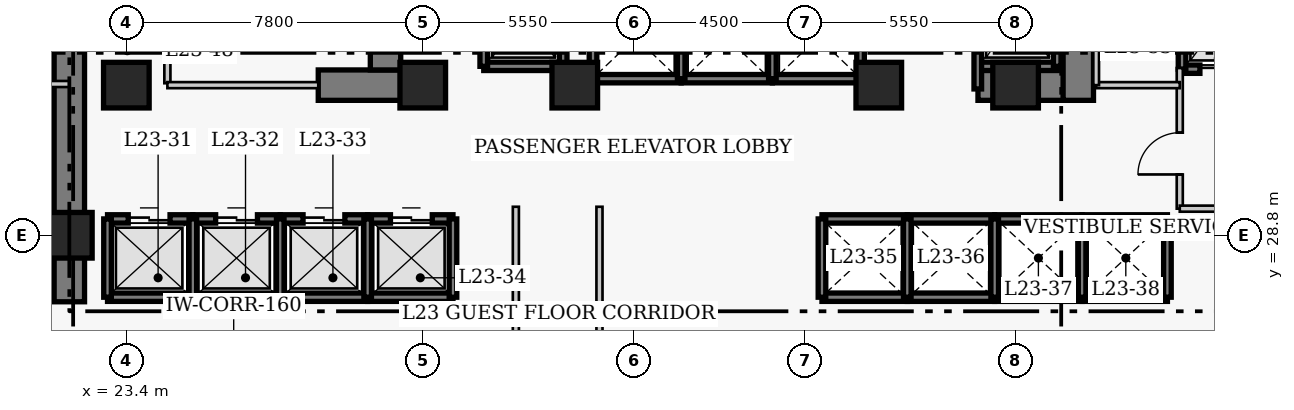
"""IFC4 building model, lengths in metres.
Left out: names, types, materials, properties, quantities, classifications, styles, units other than length and angle.
Written with IfcOpenShell. Run it as: python <this file> out.ifc"""

import sys

from ifc_helpers import new_model, si_unit, direction, frame, frame_2d, origin, origin_2d, place, context, subcontext, project, spatial, rectangle, extrude, element, fill, save


model = new_model("IFC4")
c1 = context("Model", 3, precision=1e-05, world=origin(), true_north=direction((0.0, 1.0)))
c2 = subcontext(c1, "Body", "Model", "MODEL_VIEW")
j1 = project(units=[si_unit("LENGTHUNIT", "METRE"), si_unit("PLANEANGLEUNIT", "RADIAN")], contexts=[c1])
p1 = place(None, origin())
s1 = spatial("IfcSite", under=j1, at=p1, CompositionType="ELEMENT")
p2 = place(p1, origin())
s2 = spatial("IfcBuilding", under=s1, at=p2, CompositionType="ELEMENT")
p3 = place(p2, frame((0.0, 0.0, 95.6)))
s3 = spatial("IfcBuildingStorey", under=s2, at=p3, CompositionType="ELEMENT", Elevation=95.6)
p4 = place(p3, frame((21.9, 27.05, 0.0), z_axis=(0.0, 0.0, 1.0), x_axis=(0.0, 1.0, 0.0)))
e1 = element("IfcWall", 1, at=p4, inside=s3, PredefinedType="SHEAR", context=c2, shape_type="SweptSolid", body=[
    extrude(rectangle(XDim=13.67, YDim=0.8, at=frame_2d((6.835, 0.0))), origin(), (0.0, 0.0, 1.0), 3.8),
])
p5 = place(p3, frame((28.45, 32.75, 0.0), z_axis=(0.0, 0.0, 1.0), x_axis=(1.0, 0.0, 0.0)))
e2 = element("IfcWall", 2, at=p5, inside=s3, PredefinedType="SHEAR", context=c2, shape_type="SweptSolid", body=[
    extrude(rectangle(XDim=2.4, YDim=0.8, at=frame_2d((1.2, 0.0))), origin(), (0.0, 0.0, 1.0), 3.8),
])
p6 = place(p3, frame((45.81, 32.75, 0.0), z_axis=(0.0, 0.0, 1.0), x_axis=(1.0, 0.0, 0.0)))
e3 = element("IfcWall", 3, at=p6, inside=s3, PredefinedType="SHEAR", context=c2, shape_type="SweptSolid", body=[
    extrude(rectangle(XDim=2.64, YDim=0.8, at=frame_2d((1.32, 0.0))), origin(), (0.0, 0.0, 1.0), 3.8),
])
p7 = place(p3, frame((30.22, 33.15, 0.0), z_axis=(0.0, 0.0, 1.0), x_axis=(0.0, 1.0, 0.0)))
e4 = element("IfcWall", 4, at=p7, inside=s3, PredefinedType="SHEAR", context=c2, shape_type="SweptSolid", body=[
    extrude(rectangle(XDim=7.17, YDim=0.8, at=frame_2d((3.585, 0.0))), origin(), (0.0, 0.0, 1.0), 3.8),
])
p8 = place(p3, frame((48.45, 32.35, 0.0), z_axis=(0.0, 0.0, 1.0), x_axis=(0.0, 1.0, 0.0)))
e5 = element("IfcWall", 5, at=p8, inside=s3, PredefinedType="SHEAR", context=c2, shape_type="SweptSolid", body=[
    extrude(rectangle(XDim=7.97, YDim=0.8, at=frame_2d((3.985, 0.0))), origin(), (0.0, 0.0, 1.0), 3.8),
])
p9 = place(p8, frame((5.85, 0.0, 0.0)))
e6 = element("IfcOpeningElement", 6, at=p9, cuts=e5, PredefinedType="OPENING", context=c2, shape_type="SweptSolid", body=[
    extrude(rectangle(XDim=1.1, YDim=2.15, at=frame_2d((0.55, 1.075))), frame((0.0, 0.41, 0.0), z_axis=(0.0, -1.0, 0.0), x_axis=(1.0, 0.0, 0.0)), (0.0, 0.0, 1.0), 0.82),
])
for number, where, z_axis, x_axis in (
    (7, (21.9, 28.8, 0.0), (0.0, 0.0, 1.0), (1.0, 0.0, 0.0)),
    (8, (23.4, 32.75, 0.0), (0.0, 0.0, 1.0), (1.0, 0.0, 0.0)),
    (9, (31.2, 32.75, 0.0), (0.0, 0.0, 1.0), (1.0, 0.0, 0.0)),
    (10, (35.2, 32.75, 0.0), (0.0, 0.0, 1.0), (1.0, 0.0, 0.0)),
    (11, (43.2, 32.75, 0.0), (0.0, 0.0, 1.0), (1.0, 0.0, 0.0)),
    (12, (46.8, 32.75, 0.0), (0.0, 0.0, 1.0), (1.0, 0.0, 0.0)),
):
    element("IfcColumn", number, at=place(p3, frame(where, z_axis=z_axis, x_axis=x_axis)), inside=s3, PredefinedType="COLUMN", context=c2, shape_type="SweptSolid", body=[
        extrude(rectangle(XDim=1.2, YDim=1.2, at=origin_2d()), origin(), (0.0, 0.0, 1.0), 3.8),
    ])
p10 = place(p3, frame((22.905, 29.23, 0.0), z_axis=(0.0, 0.0, 1.0), x_axis=(1.0, 0.0, 0.0)))
e13 = element("IfcWall", 13, at=p10, inside=s3, PredefinedType="SHEAR", context=c2, shape_type="SweptSolid", body=[
    extrude(rectangle(XDim=2.245, YDim=0.22, at=frame_2d((1.123, 0.0))), origin(), (0.0, 0.0, 1.0), 3.8),
])
p11 = place(p10, frame((0.545, 0.0, 0.0)))
e14 = element("IfcOpeningElement", 14, at=p11, cuts=e13, PredefinedType="OPENING", context=c2, shape_type="SweptSolid", body=[
    extrude(rectangle(XDim=1.1, YDim=2.15, at=frame_2d((0.55, 1.075))), frame((0.0, 0.12, 0.0), z_axis=(0.0, -1.0, 0.0), x_axis=(1.0, 0.0, 0.0)), (0.0, 0.0, 1.0), 0.24),
])
p12 = place(p3, frame((22.905, 27.17, 0.0), z_axis=(0.0, 0.0, 1.0), x_axis=(1.0, 0.0, 0.0)))
e15 = element("IfcWall", 15, at=p12, inside=s3, PredefinedType="SHEAR", context=c2, shape_type="SweptSolid", body=[
    extrude(rectangle(XDim=2.245, YDim=0.22, at=frame_2d((1.123, 0.0))), origin(), (0.0, 0.0, 1.0), 3.8),
])
p13 = place(p3, frame((22.905, 27.17, 0.0), z_axis=(0.0, 0.0, 1.0), x_axis=(0.0, 1.0, 0.0)))
e16 = element("IfcWall", 16, at=p13, inside=s3, PredefinedType="SHEAR", context=c2, shape_type="SweptSolid", body=[
    extrude(rectangle(XDim=2.06, YDim=0.2, at=frame_2d((1.03, 0.0))), origin(), (0.0, 0.0, 1.0), 3.8),
])
p14 = place(p3, frame((25.15, 29.23, 0.0), z_axis=(0.0, 0.0, 1.0), x_axis=(1.0, 0.0, 0.0)))
e17 = element("IfcWall", 17, at=p14, inside=s3, PredefinedType="SHEAR", context=c2, shape_type="SweptSolid", body=[
    extrude(rectangle(XDim=2.3, YDim=0.22, at=frame_2d((1.15, 0.0))), origin(), (0.0, 0.0, 1.0), 3.8),
])
p15 = place(p14, frame((0.6, 0.0, 0.0)))
e18 = element("IfcOpeningElement", 18, at=p15, cuts=e17, PredefinedType="OPENING", context=c2, shape_type="SweptSolid", body=[
    extrude(rectangle(XDim=1.1, YDim=2.15, at=frame_2d((0.55, 1.075))), frame((0.0, 0.12, 0.0), z_axis=(0.0, -1.0, 0.0), x_axis=(1.0, 0.0, 0.0)), (0.0, 0.0, 1.0), 0.24),
])
p16 = place(p3, frame((25.15, 27.17, 0.0), z_axis=(0.0, 0.0, 1.0), x_axis=(1.0, 0.0, 0.0)))
e19 = element("IfcWall", 19, at=p16, inside=s3, PredefinedType="SHEAR", context=c2, shape_type="SweptSolid", body=[
    extrude(rectangle(XDim=2.3, YDim=0.22, at=frame_2d((1.15, 0.0))), origin(), (0.0, 0.0, 1.0), 3.8),
])
p17 = place(p3, frame((25.15, 27.17, 0.0), z_axis=(0.0, 0.0, 1.0), x_axis=(0.0, 1.0, 0.0)))
e20 = element("IfcWall", 20, at=p17, inside=s3, PredefinedType="SHEAR", context=c2, shape_type="SweptSolid", body=[
    extrude(rectangle(XDim=2.06, YDim=0.2, at=frame_2d((1.03, 0.0))), origin(), (0.0, 0.0, 1.0), 3.8),
])
p18 = place(p3, frame((27.45, 29.23, 0.0), z_axis=(0.0, 0.0, 1.0), x_axis=(1.0, 0.0, 0.0)))
e21 = element("IfcWall", 21, at=p18, inside=s3, PredefinedType="SHEAR", context=c2, shape_type="SweptSolid", body=[
    extrude(rectangle(XDim=2.3, YDim=0.22, at=frame_2d((1.15, 0.0))), origin(), (0.0, 0.0, 1.0), 3.8),
])
p19 = place(p18, frame((0.6, 0.0, 0.0)))
e22 = element("IfcOpeningElement", 22, at=p19, cuts=e21, PredefinedType="OPENING", context=c2, shape_type="SweptSolid", body=[
    extrude(rectangle(XDim=1.1, YDim=2.15, at=frame_2d((0.55, 1.075))), frame((0.0, 0.12, 0.0), z_axis=(0.0, -1.0, 0.0), x_axis=(1.0, 0.0, 0.0)), (0.0, 0.0, 1.0), 0.24),
])
p20 = place(p3, frame((27.45, 27.17, 0.0), z_axis=(0.0, 0.0, 1.0), x_axis=(1.0, 0.0, 0.0)))
e23 = element("IfcWall", 23, at=p20, inside=s3, PredefinedType="SHEAR", context=c2, shape_type="SweptSolid", body=[
    extrude(rectangle(XDim=2.3, YDim=0.22, at=frame_2d((1.15, 0.0))), origin(), (0.0, 0.0, 1.0), 3.8),
])
p21 = place(p3, frame((27.45, 27.17, 0.0), z_axis=(0.0, 0.0, 1.0), x_axis=(0.0, 1.0, 0.0)))
e24 = element("IfcWall", 24, at=p21, inside=s3, PredefinedType="SHEAR", context=c2, shape_type="SweptSolid", body=[
    extrude(rectangle(XDim=2.06, YDim=0.2, at=frame_2d((1.03, 0.0))), origin(), (0.0, 0.0, 1.0), 3.8),
])
p22 = place(p3, frame((29.75, 29.23, 0.0), z_axis=(0.0, 0.0, 1.0), x_axis=(1.0, 0.0, 0.0)))
e25 = element("IfcWall", 25, at=p22, inside=s3, PredefinedType="SHEAR", context=c2, shape_type="SweptSolid", body=[
    extrude(rectangle(XDim=2.245, YDim=0.22, at=frame_2d((1.123, 0.0))), origin(), (0.0, 0.0, 1.0), 3.8),
])
p23 = place(p22, frame((0.6, 0.0, 0.0)))
e26 = element("IfcOpeningElement", 26, at=p23, cuts=e25, PredefinedType="OPENING", context=c2, shape_type="SweptSolid", body=[
    extrude(rectangle(XDim=1.1, YDim=2.15, at=frame_2d((0.55, 1.075))), frame((0.0, 0.12, 0.0), z_axis=(0.0, -1.0, 0.0), x_axis=(1.0, 0.0, 0.0)), (0.0, 0.0, 1.0), 0.24),
])
p24 = place(p3, frame((29.75, 27.17, 0.0), z_axis=(0.0, 0.0, 1.0), x_axis=(1.0, 0.0, 0.0)))
e27 = element("IfcWall", 27, at=p24, inside=s3, PredefinedType="SHEAR", context=c2, shape_type="SweptSolid", body=[
    extrude(rectangle(XDim=2.245, YDim=0.22, at=frame_2d((1.123, 0.0))), origin(), (0.0, 0.0, 1.0), 3.8),
])
for number, where, z_axis, x_axis in (
    (28, (29.75, 27.17, 0.0), (0.0, 0.0, 1.0), (0.0, 1.0, 0.0)),
    (29, (31.995, 27.17, 0.0), (0.0, 0.0, 1.0), (0.0, 1.0, 0.0)),
):
    element("IfcWall", number, at=place(p3, frame(where, z_axis=z_axis, x_axis=x_axis)), inside=s3, PredefinedType="SHEAR", context=c2, shape_type="SweptSolid", body=[
        extrude(rectangle(XDim=2.06, YDim=0.2, at=frame_2d((1.03, 0.0))), origin(), (0.0, 0.0, 1.0), 3.8),
    ])
for number, where, z_axis, x_axis in (
    (30, (41.705, 29.23, 0.0), (0.0, 0.0, 1.0), (1.0, 0.0, 0.0)),
    (31, (41.705, 27.17, 0.0), (0.0, 0.0, 1.0), (1.0, 0.0, 0.0)),
):
    element("IfcWall", number, at=place(p3, frame(where, z_axis=z_axis, x_axis=x_axis)), inside=s3, PredefinedType="SHEAR", context=c2, shape_type="SweptSolid", body=[
        extrude(rectangle(XDim=2.245, YDim=0.22, at=frame_2d((1.123, 0.0))), origin(), (0.0, 0.0, 1.0), 3.8),
    ])
p25 = place(p3, frame((41.705, 27.17, 0.0), z_axis=(0.0, 0.0, 1.0), x_axis=(0.0, 1.0, 0.0)))
e32 = element("IfcWall", 32, at=p25, inside=s3, PredefinedType="SHEAR", context=c2, shape_type="SweptSolid", body=[
    extrude(rectangle(XDim=2.06, YDim=0.2, at=frame_2d((1.03, 0.0))), origin(), (0.0, 0.0, 1.0), 3.8),
])
for number, where, z_axis, x_axis in (
    (33, (43.95, 29.23, 0.0), (0.0, 0.0, 1.0), (1.0, 0.0, 0.0)),
    (34, (43.95, 27.17, 0.0), (0.0, 0.0, 1.0), (1.0, 0.0, 0.0)),
):
    element("IfcWall", number, at=place(p3, frame(where, z_axis=z_axis, x_axis=x_axis)), inside=s3, PredefinedType="SHEAR", context=c2, shape_type="SweptSolid", body=[
        extrude(rectangle(XDim=2.3, YDim=0.22, at=frame_2d((1.15, 0.0))), origin(), (0.0, 0.0, 1.0), 3.8),
    ])
p26 = place(p3, frame((43.95, 27.17, 0.0), z_axis=(0.0, 0.0, 1.0), x_axis=(0.0, 1.0, 0.0)))
e35 = element("IfcWall", 35, at=p26, inside=s3, PredefinedType="SHEAR", context=c2, shape_type="SweptSolid", body=[
    extrude(rectangle(XDim=2.06, YDim=0.2, at=frame_2d((1.03, 0.0))), origin(), (0.0, 0.0, 1.0), 3.8),
])
for number, where, z_axis, x_axis in (
    (36, (46.25, 29.23, 0.0), (0.0, 0.0, 1.0), (1.0, 0.0, 0.0)),
    (37, (46.25, 27.17, 0.0), (0.0, 0.0, 1.0), (1.0, 0.0, 0.0)),
):
    element("IfcWall", number, at=place(p3, frame(where, z_axis=z_axis, x_axis=x_axis)), inside=s3, PredefinedType="SHEAR", context=c2, shape_type="SweptSolid", body=[
        extrude(rectangle(XDim=2.3, YDim=0.22, at=frame_2d((1.15, 0.0))), origin(), (0.0, 0.0, 1.0), 3.8),
    ])
p27 = place(p3, frame((46.25, 27.17, 0.0), z_axis=(0.0, 0.0, 1.0), x_axis=(0.0, 1.0, 0.0)))
e38 = element("IfcWall", 38, at=p27, inside=s3, PredefinedType="SHEAR", context=c2, shape_type="SweptSolid", body=[
    extrude(rectangle(XDim=2.06, YDim=0.2, at=frame_2d((1.03, 0.0))), origin(), (0.0, 0.0, 1.0), 3.8),
])
for number, where, z_axis, x_axis in (
    (39, (48.55, 29.23, 0.0), (0.0, 0.0, 1.0), (1.0, 0.0, 0.0)),
    (40, (48.55, 27.17, 0.0), (0.0, 0.0, 1.0), (1.0, 0.0, 0.0)),
):
    element("IfcWall", number, at=place(p3, frame(where, z_axis=z_axis, x_axis=x_axis)), inside=s3, PredefinedType="SHEAR", context=c2, shape_type="SweptSolid", body=[
        extrude(rectangle(XDim=2.245, YDim=0.22, at=frame_2d((1.123, 0.0))), origin(), (0.0, 0.0, 1.0), 3.8),
    ])
for number, where, z_axis, x_axis in (
    (41, (48.55, 27.17, 0.0), (0.0, 0.0, 1.0), (0.0, 1.0, 0.0)),
    (42, (50.795, 27.17, 0.0), (0.0, 0.0, 1.0), (0.0, 1.0, 0.0)),
):
    element("IfcWall", number, at=place(p3, frame(where, z_axis=z_axis, x_axis=x_axis)), inside=s3, PredefinedType="SHEAR", context=c2, shape_type="SweptSolid", body=[
        extrude(rectangle(XDim=2.06, YDim=0.2, at=frame_2d((1.03, 0.0))), origin(), (0.0, 0.0, 1.0), 3.8),
    ])
p28 = place(p3, frame((35.68, 32.92, 0.0), z_axis=(0.0, 0.0, 1.0), x_axis=(1.0, 0.0, 0.0)))
e43 = element("IfcWall", 43, at=p28, inside=s3, PredefinedType="SHEAR", context=c2, shape_type="SweptSolid", body=[
    extrude(rectangle(XDim=2.32, YDim=0.22, at=frame_2d((1.16, 0.0))), origin(), (0.0, 0.0, 1.0), 3.8),
])
p29 = place(p3, frame((35.68, 32.92, 0.0), z_axis=(0.0, 0.0, 1.0), x_axis=(0.0, 1.0, 0.0)))
e44 = element("IfcWall", 44, at=p29, inside=s3, PredefinedType="SHEAR", context=c2, shape_type="SweptSolid", body=[
    extrude(rectangle(XDim=2.16, YDim=0.2, at=frame_2d((1.08, 0.0))), origin(), (0.0, 0.0, 1.0), 3.8),
])
p30 = place(p3, frame((38.0, 32.92, 0.0), z_axis=(0.0, 0.0, 1.0), x_axis=(1.0, 0.0, 0.0)))
e45 = element("IfcWall", 45, at=p30, inside=s3, PredefinedType="SHEAR", context=c2, shape_type="SweptSolid", body=[
    extrude(rectangle(XDim=2.4, YDim=0.22, at=frame_2d((1.2, 0.0))), origin(), (0.0, 0.0, 1.0), 3.8),
])
p31 = place(p3, frame((38.0, 32.92, 0.0), z_axis=(0.0, 0.0, 1.0), x_axis=(0.0, 1.0, 0.0)))
e46 = element("IfcWall", 46, at=p31, inside=s3, PredefinedType="SHEAR", context=c2, shape_type="SweptSolid", body=[
    extrude(rectangle(XDim=2.16, YDim=0.2, at=frame_2d((1.08, 0.0))), origin(), (0.0, 0.0, 1.0), 3.8),
])
p32 = place(p3, frame((40.4, 32.92, 0.0), z_axis=(0.0, 0.0, 1.0), x_axis=(1.0, 0.0, 0.0)))
e47 = element("IfcWall", 47, at=p32, inside=s3, PredefinedType="SHEAR", context=c2, shape_type="SweptSolid", body=[
    extrude(rectangle(XDim=2.32, YDim=0.22, at=frame_2d((1.16, 0.0))), origin(), (0.0, 0.0, 1.0), 3.8),
])
for number, where, z_axis, x_axis in (
    (48, (40.4, 32.92, 0.0), (0.0, 0.0, 1.0), (0.0, 1.0, 0.0)),
    (49, (42.72, 32.92, 0.0), (0.0, 0.0, 1.0), (0.0, 1.0, 0.0)),
):
    element("IfcWall", number, at=place(p3, frame(where, z_axis=z_axis, x_axis=x_axis)), inside=s3, PredefinedType="SHEAR", context=c2, shape_type="SweptSolid", body=[
        extrude(rectangle(XDim=2.16, YDim=0.2, at=frame_2d((1.08, 0.0))), origin(), (0.0, 0.0, 1.0), 3.8),
    ])
p33 = place(p3, frame((51.18, 33.17, 0.0), z_axis=(0.0, 0.0, 1.0), x_axis=(1.0, 0.0, 0.0)))
e50 = element("IfcWall", 50, at=p33, inside=s3, PredefinedType="SHEAR", context=c2, shape_type="SweptSolid", body=[
    extrude(rectangle(XDim=2.42, YDim=0.22, at=frame_2d((1.21, 0.0))), origin(), (0.0, 0.0, 1.0), 3.8),
])
p34 = place(p33, frame((0.47, 0.0, 0.0)))
e51 = element("IfcOpeningElement", 51, at=p34, cuts=e50, PredefinedType="OPENING", context=c2, shape_type="SweptSolid", body=[
    extrude(rectangle(XDim=1.3, YDim=2.15, at=frame_2d((0.65, 1.075))), frame((0.0, 0.12, 0.0), z_axis=(0.0, -1.0, 0.0), x_axis=(1.0, 0.0, 0.0)), (0.0, 0.0, 1.0), 0.24),
])
p35 = place(p3, frame((51.18, 33.17, 0.0), z_axis=(0.0, 0.0, 1.0), x_axis=(0.0, 1.0, 0.0)))
e52 = element("IfcWall", 52, at=p35, inside=s3, PredefinedType="SHEAR", context=c2, shape_type="SweptSolid", body=[
    extrude(rectangle(XDim=2.86, YDim=0.2, at=frame_2d((1.43, 0.0))), origin(), (0.0, 0.0, 1.0), 3.8),
])
p36 = place(p3, frame((32.805, 33.245, 0.0), z_axis=(0.0, 0.0, 1.0), x_axis=(1.0, 0.0, 0.0)))
e53 = element("IfcWall", 53, at=p36, inside=s3, PredefinedType="SHEAR", context=c2, shape_type="SweptSolid", body=[
    extrude(rectangle(XDim=2.09, YDim=0.22, at=frame_2d((1.045, 0.0))), origin(), (0.0, 0.0, 1.0), 3.8),
])
for number, where, z_axis, x_axis in (
    (54, (32.805, 33.245, 0.0), (0.0, 0.0, 1.0), (0.0, 1.0, 0.0)),
    (55, (34.895, 33.245, 0.0), (0.0, 0.0, 1.0), (0.0, 1.0, 0.0)),
):
    element("IfcWall", number, at=place(p3, frame(where, z_axis=z_axis, x_axis=x_axis)), inside=s3, PredefinedType="SHEAR", context=c2, shape_type="SweptSolid", body=[
        extrude(rectangle(XDim=2.91, YDim=0.2, at=frame_2d((1.455, 0.0))), origin(), (0.0, 0.0, 1.0), 3.8),
    ])
p37 = place(p3, frame((45.805, 33.245, 0.0), z_axis=(0.0, 0.0, 1.0), x_axis=(1.0, 0.0, 0.0)))
e56 = element("IfcWall", 56, at=p37, inside=s3, PredefinedType="SHEAR", context=c2, shape_type="SweptSolid", body=[
    extrude(rectangle(XDim=2.09, YDim=0.22, at=frame_2d((1.045, 0.0))), origin(), (0.0, 0.0, 1.0), 3.8),
])
p38 = place(p3, frame((45.805, 32.65, 0.0), z_axis=(0.0, 0.0, 1.0), x_axis=(0.0, 1.0, 0.0)))
e57 = element("IfcWall", 57, at=p38, inside=s3, PredefinedType="SHEAR", context=c2, shape_type="SweptSolid", body=[
    extrude(rectangle(XDim=3.505, YDim=0.2, at=frame_2d((1.752, 0.0))), origin(), (0.0, 0.0, 1.0), 3.8),
])
p39 = place(p3, frame((47.895, 33.245, 0.0), z_axis=(0.0, 0.0, 1.0), x_axis=(0.0, 1.0, 0.0)))
e58 = element("IfcWall", 58, at=p39, inside=s3, PredefinedType="SHEAR", context=c2, shape_type="SweptSolid", body=[
    extrude(rectangle(XDim=2.91, YDim=0.2, at=frame_2d((1.455, 0.0))), origin(), (0.0, 0.0, 1.0), 3.8),
])
p40 = place(p3, frame((24.48, 32.8, 0.0), z_axis=(0.0, 0.0, 1.0), x_axis=(0.0, 1.0, 0.0)))
e59 = element("IfcWall", 59, at=p40, inside=s3, PredefinedType="PARTITIONING", context=c2, shape_type="SweptSolid", body=[
    extrude(rectangle(XDim=3.57, YDim=0.16, at=frame_2d((1.785, 0.0))), origin(), (0.0, 0.0, 1.0), 3.54),
])
p41 = place(p40, frame((1.604, 0.0, 0.0)))
e60 = element("IfcOpeningElement", 60, at=p41, cuts=e59, PredefinedType="OPENING", context=c2, shape_type="SweptSolid", body=[
    extrude(rectangle(XDim=0.9, YDim=2.1, at=frame_2d((0.45, 1.05))), frame((0.0, 0.09, 0.0), z_axis=(0.0, -1.0, 0.0), x_axis=(1.0, 0.0, 0.0)), (0.0, 0.0, 1.0), 0.18),
])
p42 = place(p3, frame((51.12, 29.5, 0.0), z_axis=(0.0, 0.0, 1.0), x_axis=(0.0, 1.0, 0.0)))
e61 = element("IfcWall", 61, at=p42, inside=s3, PredefinedType="PARTITIONING", context=c2, shape_type="SweptSolid", body=[
    extrude(rectangle(XDim=3.7, YDim=0.16, at=frame_2d((1.85, 0.0))), origin(), (0.0, 0.0, 1.0), 3.54),
])
p43 = place(p42, frame((0.9, 0.0, 0.0)))
e62 = element("IfcOpeningElement", 62, at=p43, cuts=e61, PredefinedType="OPENING", context=c2, shape_type="SweptSolid", body=[
    extrude(rectangle(XDim=1.1, YDim=2.15, at=frame_2d((0.55, 1.075))), frame((0.0, 0.09, 0.0), z_axis=(0.0, -1.0, 0.0), x_axis=(1.0, 0.0, 0.0)), (0.0, 0.0, 1.0), 0.18),
])
p44 = place(p3, frame((51.12, 29.5, 0.0), z_axis=(0.0, 0.0, 1.0), x_axis=(1.0, 0.0, 0.0)))
e63 = element("IfcWall", 63, at=p44, inside=s3, PredefinedType="PARTITIONING", context=c2, shape_type="SweptSolid", body=[
    extrude(rectangle(XDim=5.63, YDim=0.16, at=frame_2d((2.815, 0.0))), origin(), (0.0, 0.0, 1.0), 3.54),
])
p45 = place(p3, frame((24.48, 32.75, 0.0), z_axis=(0.0, 0.0, 1.0), x_axis=(1.0, 0.0, 0.0)))
e64 = element("IfcWall", 64, at=p45, inside=s3, PredefinedType="PARTITIONING", context=c2, shape_type="SweptSolid", body=[
    extrude(rectangle(XDim=3.97, YDim=0.16, at=frame_2d((1.985, 0.0))), origin(), (0.0, 0.0, 1.0), 3.54),
])
p46 = place(p3, frame((48.92, 32.75, 0.0), z_axis=(0.0, 0.0, 1.0), x_axis=(1.0, 0.0, 0.0)))
e65 = element("IfcWall", 65, at=p46, inside=s3, PredefinedType="PARTITIONING", context=c2, shape_type="SweptSolid", body=[
    extrude(rectangle(XDim=2.2, YDim=0.16, at=frame_2d((1.1, 0.0))), origin(), (0.0, 0.0, 1.0), 3.54),
])
p47 = place(p3, frame((48.92, 32.75, 0.0), z_axis=(0.0, 0.0, 1.0), x_axis=(0.0, 1.0, 0.0)))
e66 = element("IfcWall", 66, at=p47, inside=s3, PredefinedType="PARTITIONING", context=c2, shape_type="SweptSolid", body=[
    extrude(rectangle(XDim=3.62, YDim=0.15, at=frame_2d((1.81, 0.0))), origin(), (0.0, 0.0, 1.0), 3.54),
])
for number, where, z_axis, x_axis in (
    (67, (33.65, 26.11, 0.0), (0.0, 0.0, 1.0), (0.0, 1.0, 0.0)),
    (68, (35.85, 26.11, 0.0), (0.0, 0.0, 1.0), (0.0, 1.0, 0.0)),
):
    element("IfcWall", number, at=place(p3, frame(where, z_axis=z_axis, x_axis=x_axis)), inside=s3, PredefinedType="PARTITIONING", context=c2, shape_type="SweptSolid", body=[
        extrude(rectangle(XDim=3.44, YDim=0.16, at=frame_2d((1.72, 0.0))), origin(), (0.0, 0.0, 1.0), 3.54),
    ])
p48 = place(p3, frame((18.86, 32.78, 0.0), z_axis=(0.0, 0.0, 1.0), x_axis=(1.0, 0.0, 0.0)))
e69 = element("IfcWall", 69, at=p48, inside=s3, PredefinedType="PARTITIONING", context=c2, shape_type="SweptSolid", body=[
    extrude(rectangle(XDim=3.04, YDim=0.16, at=frame_2d((1.52, 0.0))), origin(), (0.0, 0.0, 1.0), 3.54),
])
p49 = place(p11, origin())
e70 = element("IfcDoor", 70, at=p49, inside=s3, OperationType="DOUBLE_DOOR_SLIDING", PredefinedType="DOOR", context=c2, shape_type="SweptSolid", body=[
    extrude(rectangle(XDim=1.1, YDim=2.15, at=frame_2d((0.55, 1.075))), frame((0.0, 0.025, 0.0), z_axis=(0.0, -1.0, 0.0), x_axis=(1.0, 0.0, 0.0)), (0.0, 0.0, 1.0), 0.05),
])
fill(e14, e70)
p50 = place(p15, origin())
e71 = element("IfcDoor", 71, at=p50, inside=s3, OperationType="DOUBLE_DOOR_SLIDING", PredefinedType="DOOR", context=c2, shape_type="SweptSolid", body=[
    extrude(rectangle(XDim=1.1, YDim=2.15, at=frame_2d((0.55, 1.075))), frame((0.0, 0.025, 0.0), z_axis=(0.0, -1.0, 0.0), x_axis=(1.0, 0.0, 0.0)), (0.0, 0.0, 1.0), 0.05),
])
fill(e18, e71)
p51 = place(p19, origin())
e72 = element("IfcDoor", 72, at=p51, inside=s3, OperationType="DOUBLE_DOOR_SLIDING", PredefinedType="DOOR", context=c2, shape_type="SweptSolid", body=[
    extrude(rectangle(XDim=1.1, YDim=2.15, at=frame_2d((0.55, 1.075))), frame((0.0, 0.025, 0.0), z_axis=(0.0, -1.0, 0.0), x_axis=(1.0, 0.0, 0.0)), (0.0, 0.0, 1.0), 0.05),
])
fill(e22, e72)
p52 = place(p23, origin())
e73 = element("IfcDoor", 73, at=p52, inside=s3, OperationType="DOUBLE_DOOR_SLIDING", PredefinedType="DOOR", context=c2, shape_type="SweptSolid", body=[
    extrude(rectangle(XDim=1.1, YDim=2.15, at=frame_2d((0.55, 1.075))), frame((0.0, 0.025, 0.0), z_axis=(0.0, -1.0, 0.0), x_axis=(1.0, 0.0, 0.0)), (0.0, 0.0, 1.0), 0.05),
])
fill(e26, e73)
p53 = place(p34, origin())
e74 = element("IfcDoor", 74, at=p53, inside=s3, OperationType="DOUBLE_DOOR_SLIDING", PredefinedType="DOOR", context=c2, shape_type="SweptSolid", body=[
    extrude(rectangle(XDim=1.3, YDim=2.15, at=frame_2d((0.65, 1.075))), frame((0.0, 0.025, 0.0), z_axis=(0.0, -1.0, 0.0), x_axis=(1.0, 0.0, 0.0)), (0.0, 0.0, 1.0), 0.05),
])
fill(e51, e74)
p54 = place(p43, origin())
e75 = element("IfcDoor", 75, at=p54, inside=s3, OperationType="SINGLE_SWING_LEFT", PredefinedType="DOOR", context=c2, shape_type="SweptSolid", body=[
    extrude(rectangle(XDim=1.1, YDim=2.15, at=frame_2d((0.55, 1.075))), frame((0.0, 0.025, 0.0), z_axis=(0.0, -1.0, 0.0), x_axis=(1.0, 0.0, 0.0)), (0.0, 0.0, 1.0), 0.05),
])
fill(e62, e75)
save(model, sys.argv[1])
